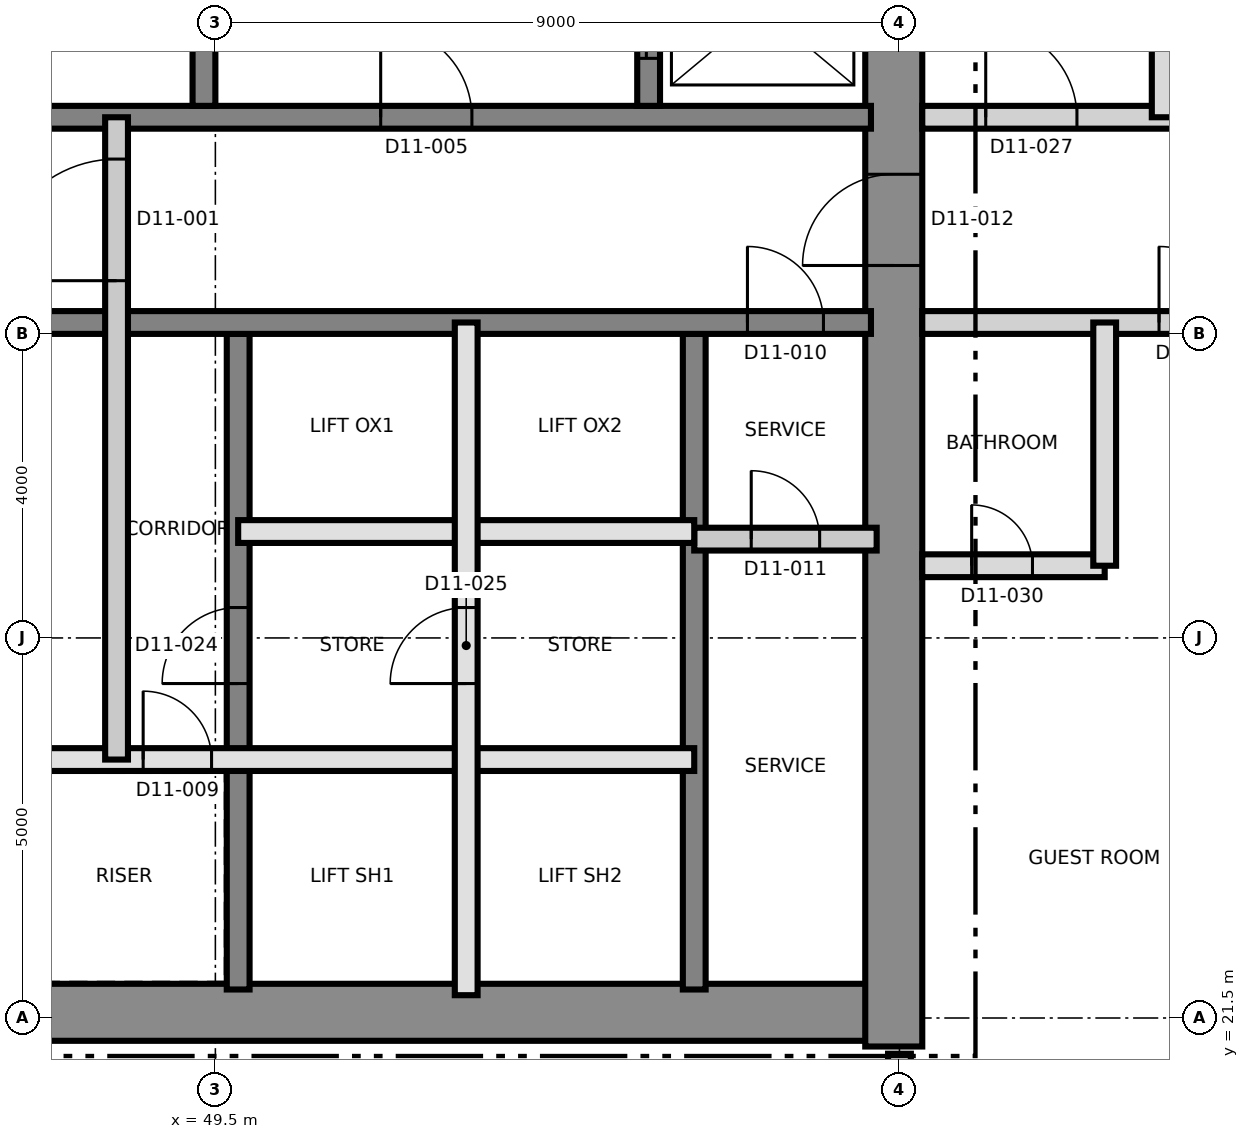
"""IFC4 building model, lengths in metres.
Left out: names, types, materials, properties, quantities, classifications, styles, units other than length and angle.
Written with IfcOpenShell. Run it as: python <this file> out.ifc"""

import sys

from ifc_helpers import new_model, si_unit, direction, frame, frame_2d, origin, place, context, subcontext, project, spatial, rectangle, extrude, element, fill, save


model = new_model("IFC4")
c1 = context("Model", 3, precision=1e-05, world=origin(), true_north=direction((0.0, 1.0)))
c2 = subcontext(c1, "Body", "Model", "MODEL_VIEW")
j1 = project(units=[si_unit("LENGTHUNIT", "METRE"), si_unit("PLANEANGLEUNIT", "RADIAN")], contexts=[c1])
p1 = place(None, origin())
s1 = spatial("IfcSite", under=j1, at=p1, CompositionType="ELEMENT")
p2 = place(p1, origin())
s2 = spatial("IfcBuilding", under=s1, at=p2, CompositionType="ELEMENT")
p3 = place(p2, frame((0.0, 0.0, 131.5)))
s3 = spatial("IfcBuildingStorey", under=s2, at=p3, CompositionType="ELEMENT", Elevation=131.5)
p4 = place(p3, frame((31.125, 21.575, 0.0), z_axis=(0.0, 0.0, 1.0), x_axis=(1.0, 0.0, 0.0)))
e1 = element("IfcWall", 1, at=p4, inside=s3, PredefinedType="SHEAR", context=c2, shape_type="SweptSolid", body=[
    extrude(rectangle(XDim=27.0, YDim=0.75, at=frame_2d((13.5, 0.0))), origin(), (0.0, 0.0, 1.0), 3.7),
])
p5 = place(p3, frame((58.425, 21.125, 0.0), z_axis=(0.0, 0.0, 1.0), x_axis=(0.0, 1.0, 0.0)))
e2 = element("IfcWall", 2, at=p5, inside=s3, PredefinedType="SHEAR", context=c2, shape_type="SweptSolid", body=[
    extrude(rectangle(XDim=18.75, YDim=0.75, at=frame_2d((9.375, 0.0))), origin(), (0.0, 0.0, 1.0), 3.7),
])
p6 = place(p5, frame((10.275, 0.0, 0.0)))
e3 = element("IfcOpeningElement", 3, at=p6, cuts=e2, PredefinedType="OPENING", context=c2, shape_type="SweptSolid", body=[
    extrude(rectangle(XDim=1.2, YDim=2.1, at=frame_2d((0.6, 1.05))), frame((0.0, 0.385, 0.0), z_axis=(0.0, -1.0, 0.0), x_axis=(1.0, 0.0, 0.0)), (0.0, 0.0, 1.0), 0.77),
])
p7 = place(p3, frame((49.8, 21.875, 0.0), z_axis=(0.0, 0.0, 1.0), x_axis=(0.0, 1.0, 0.0)))
e4 = element("IfcWall", 4, at=p7, inside=s3, PredefinedType="SHEAR", context=c2, shape_type="SweptSolid", body=[
    extrude(rectangle(XDim=8.625, YDim=0.3, at=frame_2d((4.312, 0.0))), origin(), (0.0, 0.0, 1.0), 3.7),
])
p8 = place(p7, frame((4.025, 0.0, 0.0)))
e5 = element("IfcOpeningElement", 5, at=p8, cuts=e4, PredefinedType="OPENING", context=c2, shape_type="SweptSolid", body=[
    extrude(rectangle(XDim=1.0, YDim=2.1, at=frame_2d((0.5, 1.05))), frame((0.0, 0.16, 0.0), z_axis=(0.0, -1.0, 0.0), x_axis=(1.0, 0.0, 0.0)), (0.0, 0.0, 1.0), 0.32),
])
p9 = place(p3, frame((55.8, 21.875, 0.0), z_axis=(0.0, 0.0, 1.0), x_axis=(0.0, 1.0, 0.0)))
e6 = element("IfcWall", 6, at=p9, inside=s3, PredefinedType="SHEAR", context=c2, shape_type="SweptSolid", body=[
    extrude(rectangle(XDim=8.625, YDim=0.3, at=frame_2d((4.312, 0.0))), origin(), (0.0, 0.0, 1.0), 3.7),
])
p10 = place(p3, frame((31.875, 30.65, 0.0), z_axis=(0.0, 0.0, 1.0), x_axis=(1.0, 0.0, 0.0)))
e7 = element("IfcWall", 7, at=p10, inside=s3, PredefinedType="SHEAR", context=c2, shape_type="SweptSolid", body=[
    extrude(rectangle(XDim=26.25, YDim=0.3, at=frame_2d((13.125, 0.0))), origin(), (0.0, 0.0, 1.0), 3.7),
])
p11 = place(p10, frame((24.625, 0.0, 0.0)))
e8 = element("IfcOpeningElement", 8, at=p11, cuts=e7, PredefinedType="OPENING", context=c2, shape_type="SweptSolid", body=[
    extrude(rectangle(XDim=1.0, YDim=2.1, at=frame_2d((0.5, 1.05))), frame((0.0, 0.16, 0.0), z_axis=(0.0, -1.0, 0.0), x_axis=(1.0, 0.0, 0.0)), (0.0, 0.0, 1.0), 0.32),
])
p12 = place(p10, frame((11.425, 0.0, 0.0)))
e9 = element("IfcOpeningElement", 9, at=p12, cuts=e7, PredefinedType="OPENING", context=c2, shape_type="SweptSolid", body=[
    extrude(rectangle(XDim=1.0, YDim=2.1, at=frame_2d((0.5, 1.05))), frame((0.0, 0.16, 0.0), z_axis=(0.0, -1.0, 0.0), x_axis=(1.0, 0.0, 0.0)), (0.0, 0.0, 1.0), 0.32),
])
p13 = place(p3, frame((31.875, 33.35, 0.0), z_axis=(0.0, 0.0, 1.0), x_axis=(1.0, 0.0, 0.0)))
e10 = element("IfcWall", 10, at=p13, inside=s3, PredefinedType="SHEAR", context=c2, shape_type="SweptSolid", body=[
    extrude(rectangle(XDim=26.25, YDim=0.3, at=frame_2d((13.125, 0.0))), origin(), (0.0, 0.0, 1.0), 3.7),
])
p14 = place(p13, frame((13.2, 0.0, 0.0)))
e11 = element("IfcOpeningElement", 11, at=p14, cuts=e10, PredefinedType="OPENING", context=c2, shape_type="SweptSolid", body=[
    extrude(rectangle(XDim=1.4, YDim=2.1, at=frame_2d((0.7, 1.05))), frame((0.0, 0.16, 0.0), z_axis=(0.0, -1.0, 0.0), x_axis=(1.0, 0.0, 0.0)), (0.0, 0.0, 1.0), 0.32),
])
p15 = place(p13, frame((5.25, 0.0, 0.0)))
e12 = element("IfcOpeningElement", 12, at=p15, cuts=e10, PredefinedType="OPENING", context=c2, shape_type="SweptSolid", body=[
    extrude(rectangle(XDim=1.2, YDim=2.1, at=frame_2d((0.6, 1.05))), frame((0.0, 0.16, 0.0), z_axis=(0.0, -1.0, 0.0), x_axis=(1.0, 0.0, 0.0)), (0.0, 0.0, 1.0), 0.32),
])
p16 = place(p13, frame((19.8, 0.0, 0.0)))
e13 = element("IfcOpeningElement", 13, at=p16, cuts=e10, PredefinedType="OPENING", context=c2, shape_type="SweptSolid", body=[
    extrude(rectangle(XDim=1.2, YDim=2.1, at=frame_2d((0.6, 1.05))), frame((0.0, 0.16, 0.0), z_axis=(0.0, -1.0, 0.0), x_axis=(1.0, 0.0, 0.0)), (0.0, 0.0, 1.0), 0.32),
])
p17 = place(p3, frame((49.35, 33.5, 0.0), z_axis=(0.0, 0.0, 1.0), x_axis=(0.0, 1.0, 0.0)))
e14 = element("IfcWall", 14, at=p17, inside=s3, PredefinedType="SHEAR", context=c2, shape_type="SweptSolid", body=[
    extrude(rectangle(XDim=5.625, YDim=0.3, at=frame_2d((2.812, 0.0))), origin(), (0.0, 0.0, 1.0), 3.7),
])
p18 = place(p3, frame((55.2, 33.5, 0.0), z_axis=(0.0, 0.0, 1.0), x_axis=(0.0, 1.0, 0.0)))
e15 = element("IfcWall", 15, at=p18, inside=s3, PredefinedType="SHEAR", context=c2, shape_type="SweptSolid", body=[
    extrude(rectangle(XDim=2.55, YDim=0.3, at=frame_2d((1.275, 0.0))), origin(), (0.0, 0.0, 1.0), 3.7),
])
p19 = place(p18, frame((0.625, 0.0, 0.0)))
e16 = element("IfcOpeningElement", 16, at=p19, cuts=e15, PredefinedType="OPENING", context=c2, shape_type="SweptSolid", body=[
    extrude(rectangle(XDim=1.3, YDim=2.4, at=frame_2d((0.65, 1.2))), frame((0.0, 0.16, 0.0), z_axis=(0.0, -1.0, 0.0), x_axis=(1.0, 0.0, 0.0)), (0.0, 0.0, 1.0), 0.32),
])
p20 = place(p3, frame((46.8, 24.9, 0.0), z_axis=(0.0, 0.0, 1.0), x_axis=(1.0, 0.0, 0.0)))
e17 = element("IfcWall", 17, at=p20, inside=s3, PredefinedType="SOLIDWALL", context=c2, shape_type="SweptSolid", body=[
    extrude(rectangle(XDim=9.0, YDim=0.3, at=frame_2d((4.5, 0.0))), origin(), (0.0, 0.0, 1.0), 3.4),
])
p21 = place(p20, frame((1.75, 0.0, 0.0)))
e18 = element("IfcOpeningElement", 18, at=p21, cuts=e17, PredefinedType="OPENING", context=c2, shape_type="SweptSolid", body=[
    extrude(rectangle(XDim=0.9, YDim=2.1, at=frame_2d((0.45, 1.05))), frame((0.0, 0.16, 0.0), z_axis=(0.0, -1.0, 0.0), x_axis=(1.0, 0.0, 0.0)), (0.0, 0.0, 1.0), 0.32),
])
p22 = place(p3, frame((55.8, 27.8, 0.0), z_axis=(0.0, 0.0, 1.0), x_axis=(1.0, 0.0, 0.0)))
e19 = element("IfcWall", 19, at=p22, inside=s3, PredefinedType="PARTITIONING", context=c2, shape_type="SweptSolid", body=[
    extrude(rectangle(XDim=2.4, YDim=0.3, at=frame_2d((1.2, 0.0))), origin(), (0.0, 0.0, 1.0), 3.4),
])
p23 = place(p22, frame((0.75, 0.0, 0.0)))
e20 = element("IfcOpeningElement", 20, at=p23, cuts=e19, PredefinedType="OPENING", context=c2, shape_type="SweptSolid", body=[
    extrude(rectangle(XDim=0.9, YDim=2.1, at=frame_2d((0.45, 1.05))), frame((0.0, 0.16, 0.0), z_axis=(0.0, -1.0, 0.0), x_axis=(1.0, 0.0, 0.0)), (0.0, 0.0, 1.0), 0.32),
])
p24 = place(p3, frame((49.8, 27.9, 0.0), z_axis=(0.0, 0.0, 1.0), x_axis=(1.0, 0.0, 0.0)))
e21 = element("IfcWall", 21, at=p24, inside=s3, PredefinedType="SOLIDWALL", context=c2, shape_type="SweptSolid", body=[
    extrude(rectangle(XDim=6.0, YDim=0.3, at=frame_2d((3.0, 0.0))), origin(), (0.0, 0.0, 1.0), 3.4),
])
p25 = place(p3, frame((48.2, 24.9, 0.0), z_axis=(0.0, 0.0, 1.0), x_axis=(0.0, 1.0, 0.0)))
e22 = element("IfcWall", 22, at=p25, inside=s3, PredefinedType="PARTITIONING", context=c2, shape_type="SweptSolid", body=[
    extrude(rectangle(XDim=8.45, YDim=0.3, at=frame_2d((4.225, 0.0))), origin(), (0.0, 0.0, 1.0), 3.4),
])
p26 = place(p25, frame((6.3, 0.0, 0.0)))
e23 = element("IfcOpeningElement", 23, at=p26, cuts=e22, PredefinedType="OPENING", context=c2, shape_type="SweptSolid", body=[
    extrude(rectangle(XDim=1.6, YDim=2.1, at=frame_2d((0.8, 1.05))), frame((0.0, 0.16, 0.0), z_axis=(0.0, -1.0, 0.0), x_axis=(1.0, 0.0, 0.0)), (0.0, 0.0, 1.0), 0.32),
])
p27 = place(p3, frame((52.8, 21.8, 0.0), z_axis=(0.0, 0.0, 1.0), x_axis=(0.0, 1.0, 0.0)))
e24 = element("IfcWall", 24, at=p27, inside=s3, PredefinedType="SOLIDWALL", context=c2, shape_type="SweptSolid", body=[
    extrude(rectangle(XDim=8.85, YDim=0.3, at=frame_2d((4.425, 0.0))), origin(), (0.0, 0.0, 1.0), 3.4),
])
p28 = place(p27, frame((4.1, 0.0, 0.0)))
e25 = element("IfcOpeningElement", 25, at=p28, cuts=e24, PredefinedType="OPENING", context=c2, shape_type="SweptSolid", body=[
    extrude(rectangle(XDim=1.0, YDim=2.1, at=frame_2d((0.5, 1.05))), frame((0.0, 0.16, 0.0), z_axis=(0.0, -1.0, 0.0), x_axis=(1.0, 0.0, 0.0)), (0.0, 0.0, 1.0), 0.32),
])
p29 = place(p3, frame((58.8, 27.45, 0.0), z_axis=(0.0, 0.0, 1.0), x_axis=(1.0, 0.0, 0.0)))
e26 = element("IfcWall", 26, at=p29, inside=s3, PredefinedType="PARTITIONING", context=c2, shape_type="SweptSolid", body=[
    extrude(rectangle(XDim=2.4, YDim=0.3, at=frame_2d((1.2, 0.0))), origin(), (0.0, 0.0, 1.0), 3.4),
])
p30 = place(p29, frame((0.65, 0.0, 0.0)))
e27 = element("IfcOpeningElement", 27, at=p30, cuts=e26, PredefinedType="OPENING", context=c2, shape_type="SweptSolid", body=[
    extrude(rectangle(XDim=0.8, YDim=2.1, at=frame_2d((0.4, 1.05))), frame((0.0, 0.16, 0.0), z_axis=(0.0, -1.0, 0.0), x_axis=(1.0, 0.0, 0.0)), (0.0, 0.0, 1.0), 0.32),
])
p31 = place(p3, frame((58.8, 30.65, 0.0), z_axis=(0.0, 0.0, 1.0), x_axis=(1.0, 0.0, 0.0)))
e28 = element("IfcWall", 28, at=p31, inside=s3, PredefinedType="PARTITIONING", context=c2, shape_type="SweptSolid", body=[
    extrude(rectangle(XDim=26.53, YDim=0.3, at=frame_2d((13.265, 0.0))), origin(), (0.0, 0.0, 1.0), 3.4),
])
p32 = place(p31, frame((3.115, 0.0, 0.0)))
e29 = element("IfcOpeningElement", 29, at=p32, cuts=e28, PredefinedType="OPENING", context=c2, shape_type="SweptSolid", body=[
    extrude(rectangle(XDim=1.0, YDim=2.1, at=frame_2d((0.5, 1.05))), frame((0.0, 0.16, 0.0), z_axis=(0.0, -1.0, 0.0), x_axis=(1.0, 0.0, 0.0)), (0.0, 0.0, 1.0), 0.32),
])
p33 = place(p31, frame((6.065, 0.0, 0.0)))
e30 = element("IfcOpeningElement", 30, at=p33, cuts=e28, PredefinedType="OPENING", context=c2, shape_type="SweptSolid", body=[
    extrude(rectangle(XDim=1.4, YDim=2.1, at=frame_2d((0.7, 1.05))), frame((0.0, 0.16, 0.0), z_axis=(0.0, -1.0, 0.0), x_axis=(1.0, 0.0, 0.0)), (0.0, 0.0, 1.0), 0.32),
])
p34 = place(p31, frame((12.7, 0.0, 0.0)))
e31 = element("IfcOpeningElement", 31, at=p34, cuts=e28, PredefinedType="OPENING", context=c2, shape_type="SweptSolid", body=[
    extrude(rectangle(XDim=1.0, YDim=2.4, at=frame_2d((0.5, 1.2))), frame((0.0, 0.16, 0.0), z_axis=(0.0, -1.0, 0.0), x_axis=(1.0, 0.0, 0.0)), (0.0, 0.0, 1.0), 0.32),
])
p35 = place(p31, frame((18.85, 0.0, 0.0)))
e32 = element("IfcOpeningElement", 32, at=p35, cuts=e28, PredefinedType="OPENING", context=c2, shape_type="SweptSolid", body=[
    extrude(rectangle(XDim=1.0, YDim=2.1, at=frame_2d((0.5, 1.05))), frame((0.0, 0.16, 0.0), z_axis=(0.0, -1.0, 0.0), x_axis=(1.0, 0.0, 0.0)), (0.0, 0.0, 1.0), 0.32),
])
p36 = place(p31, frame((24.7, 0.0, 0.0)))
e33 = element("IfcOpeningElement", 33, at=p36, cuts=e28, PredefinedType="OPENING", context=c2, shape_type="SweptSolid", body=[
    extrude(rectangle(XDim=1.0, YDim=2.1, at=frame_2d((0.5, 1.05))), frame((0.0, 0.16, 0.0), z_axis=(0.0, -1.0, 0.0), x_axis=(1.0, 0.0, 0.0)), (0.0, 0.0, 1.0), 0.32),
])
p37 = place(p3, frame((58.8, 33.35, 0.0), z_axis=(0.0, 0.0, 1.0), x_axis=(1.0, 0.0, 0.0)))
e34 = element("IfcWall", 34, at=p37, inside=s3, PredefinedType="PARTITIONING", context=c2, shape_type="SweptSolid", body=[
    extrude(rectangle(XDim=26.53, YDim=0.3, at=frame_2d((13.265, 0.0))), origin(), (0.0, 0.0, 1.0), 3.4),
])
p38 = place(p37, frame((0.835, 0.0, 0.0)))
e35 = element("IfcOpeningElement", 35, at=p38, cuts=e34, PredefinedType="OPENING", context=c2, shape_type="SweptSolid", body=[
    extrude(rectangle(XDim=1.2, YDim=2.1, at=frame_2d((0.6, 1.05))), frame((0.0, 0.16, 0.0), z_axis=(0.0, -1.0, 0.0), x_axis=(1.0, 0.0, 0.0)), (0.0, 0.0, 1.0), 0.32),
])
p39 = place(p37, frame((4.085, 0.0, 0.0)))
e36 = element("IfcOpeningElement", 36, at=p39, cuts=e34, PredefinedType="OPENING", context=c2, shape_type="SweptSolid", body=[
    extrude(rectangle(XDim=1.0, YDim=2.1, at=frame_2d((0.5, 1.05))), frame((0.0, 0.16, 0.0), z_axis=(0.0, -1.0, 0.0), x_axis=(1.0, 0.0, 0.0)), (0.0, 0.0, 1.0), 0.32),
])
p40 = place(p37, frame((12.7, 0.0, 0.0)))
e37 = element("IfcOpeningElement", 37, at=p40, cuts=e34, PredefinedType="OPENING", context=c2, shape_type="SweptSolid", body=[
    extrude(rectangle(XDim=1.0, YDim=2.4, at=frame_2d((0.5, 1.2))), frame((0.0, 0.16, 0.0), z_axis=(0.0, -1.0, 0.0), x_axis=(1.0, 0.0, 0.0)), (0.0, 0.0, 1.0), 0.32),
])
p41 = place(p37, frame((21.115, 0.0, 0.0)))
e38 = element("IfcOpeningElement", 38, at=p41, cuts=e34, PredefinedType="OPENING", context=c2, shape_type="SweptSolid", body=[
    extrude(rectangle(XDim=1.0, YDim=2.1, at=frame_2d((0.5, 1.05))), frame((0.0, 0.16, 0.0), z_axis=(0.0, -1.0, 0.0), x_axis=(1.0, 0.0, 0.0)), (0.0, 0.0, 1.0), 0.32),
])
p42 = place(p37, frame((24.065, 0.0, 0.0)))
e39 = element("IfcOpeningElement", 39, at=p42, cuts=e34, PredefinedType="OPENING", context=c2, shape_type="SweptSolid", body=[
    extrude(rectangle(XDim=1.4, YDim=2.1, at=frame_2d((0.7, 1.05))), frame((0.0, 0.16, 0.0), z_axis=(0.0, -1.0, 0.0), x_axis=(1.0, 0.0, 0.0)), (0.0, 0.0, 1.0), 0.32),
])
p43 = place(p3, frame((58.5, 20.135, 0.0), z_axis=(0.0, 0.0, 1.0), x_axis=(0.0, 1.0, 0.0)))
e40 = element("IfcWall", 40, at=p43, inside=s3, PredefinedType="PARTITIONING", context=c2, shape_type="SweptSolid", body=[
    extrude(rectangle(XDim=0.895, YDim=0.3, at=frame_2d((0.448, 0.0))), origin(), (0.0, 0.0, 1.0), 3.35),
])
p44 = place(p3, frame((61.2, 27.45, 0.0), z_axis=(0.0, 0.0, 1.0), x_axis=(0.0, 1.0, 0.0)))
e41 = element("IfcWall", 41, at=p44, inside=s3, PredefinedType="PARTITIONING", context=c2, shape_type="SweptSolid", body=[
    extrude(rectangle(XDim=3.2, YDim=0.3, at=frame_2d((1.6, 0.0))), origin(), (0.0, 0.0, 1.0), 3.4),
])
p45 = place(p3, frame((61.97, 33.35, 0.0), z_axis=(0.0, 0.0, 1.0), x_axis=(0.0, 1.0, 0.0)))
e42 = element("IfcWall", 42, at=p45, inside=s3, PredefinedType="PARTITIONING", context=c2, shape_type="SweptSolid", body=[
    extrude(rectangle(XDim=7.695, YDim=0.3, at=frame_2d((3.847, 0.0))), origin(), (0.0, 0.0, 1.0), 3.35),
])
p46 = place(p26, origin())
e43 = element("IfcDoor", 43, at=p46, inside=s3, OperationType="SINGLE_SWING_LEFT", PredefinedType="DOOR", context=c2, shape_type="SweptSolid", body=[
    extrude(rectangle(XDim=1.6, YDim=2.1, at=frame_2d((0.8, 1.05))), frame((0.0, 0.025, 0.0), z_axis=(0.0, -1.0, 0.0), x_axis=(1.0, 0.0, 0.0)), (0.0, 0.0, 1.0), 0.05),
])
fill(e23, e43)
p47 = place(p16, origin())
e44 = element("IfcDoor", 44, at=p47, inside=s3, OperationType="SINGLE_SWING_RIGHT", PredefinedType="DOOR", context=c2, shape_type="SweptSolid", body=[
    extrude(rectangle(XDim=1.2, YDim=2.1, at=frame_2d((0.6, 1.05))), frame((0.0, 0.025, 0.0), z_axis=(0.0, -1.0, 0.0), x_axis=(1.0, 0.0, 0.0)), (0.0, 0.0, 1.0), 0.05),
])
fill(e13, e44)
p48 = place(p21, origin())
e45 = element("IfcDoor", 45, at=p48, inside=s3, OperationType="SINGLE_SWING_RIGHT", PredefinedType="DOOR", context=c2, shape_type="SweptSolid", body=[
    extrude(rectangle(XDim=0.9, YDim=2.1, at=frame_2d((0.45, 1.05))), frame((0.0, 0.025, 0.0), z_axis=(0.0, -1.0, 0.0), x_axis=(1.0, 0.0, 0.0)), (0.0, 0.0, 1.0), 0.05),
])
fill(e18, e45)
p49 = place(p11, origin())
e46 = element("IfcDoor", 46, at=p49, inside=s3, OperationType="SINGLE_SWING_LEFT", PredefinedType="DOOR", context=c2, shape_type="SweptSolid", body=[
    extrude(rectangle(XDim=1.0, YDim=2.1, at=frame_2d((0.5, 1.05))), frame((0.0, 0.025, 0.0), z_axis=(0.0, -1.0, 0.0), x_axis=(1.0, 0.0, 0.0)), (0.0, 0.0, 1.0), 0.05),
])
fill(e8, e46)
p50 = place(p23, origin())
e47 = element("IfcDoor", 47, at=p50, inside=s3, OperationType="SINGLE_SWING_RIGHT", PredefinedType="DOOR", context=c2, shape_type="SweptSolid", body=[
    extrude(rectangle(XDim=0.9, YDim=2.1, at=frame_2d((0.45, 1.05))), frame((0.0, 0.025, 0.0), z_axis=(0.0, -1.0, 0.0), x_axis=(1.0, 0.0, 0.0)), (0.0, 0.0, 1.0), 0.05),
])
fill(e20, e47)
p51 = place(p6, origin())
e48 = element("IfcDoor", 48, at=p51, inside=s3, OperationType="SINGLE_SWING_LEFT", PredefinedType="DOOR", context=c2, shape_type="SweptSolid", body=[
    extrude(rectangle(XDim=1.2, YDim=2.1, at=frame_2d((0.6, 1.05))), frame((0.0, 0.025, 0.0), z_axis=(0.0, -1.0, 0.0), x_axis=(1.0, 0.0, 0.0)), (0.0, 0.0, 1.0), 0.05),
])
fill(e3, e48)
p52 = place(p19, origin())
e49 = element("IfcDoor", 49, at=p52, inside=s3, OperationType="SLIDING_TO_LEFT", PredefinedType="DOOR", context=c2, shape_type="SweptSolid", body=[
    extrude(rectangle(XDim=1.3, YDim=2.4, at=frame_2d((0.65, 1.2))), frame((0.0, 0.025, 0.0), z_axis=(0.0, -1.0, 0.0), x_axis=(1.0, 0.0, 0.0)), (0.0, 0.0, 1.0), 0.05),
])
fill(e16, e49)
p53 = place(p8, origin())
e50 = element("IfcDoor", 50, at=p53, inside=s3, OperationType="SINGLE_SWING_LEFT", PredefinedType="DOOR", context=c2, shape_type="SweptSolid", body=[
    extrude(rectangle(XDim=1.0, YDim=2.1, at=frame_2d((0.5, 1.05))), frame((0.0, 0.025, 0.0), z_axis=(0.0, -1.0, 0.0), x_axis=(1.0, 0.0, 0.0)), (0.0, 0.0, 1.0), 0.05),
])
fill(e5, e50)
p54 = place(p28, origin())
e51 = element("IfcDoor", 51, at=p54, inside=s3, OperationType="SINGLE_SWING_RIGHT", PredefinedType="DOOR", context=c2, shape_type="SweptSolid", body=[
    extrude(rectangle(XDim=1.0, YDim=2.1, at=frame_2d((0.5, 1.05))), frame((0.0, 0.025, 0.0), z_axis=(0.0, -1.0, 0.0), x_axis=(1.0, 0.0, 0.0)), (0.0, 0.0, 1.0), 0.05),
])
fill(e25, e51)
p55 = place(p38, origin())
e52 = element("IfcDoor", 52, at=p55, inside=s3, OperationType="SINGLE_SWING_LEFT", PredefinedType="DOOR", context=c2, shape_type="SweptSolid", body=[
    extrude(rectangle(XDim=1.2, YDim=2.1, at=frame_2d((0.6, 1.05))), frame((0.0, 0.025, 0.0), z_axis=(0.0, -1.0, 0.0), x_axis=(1.0, 0.0, 0.0)), (0.0, 0.0, 1.0), 0.05),
])
fill(e35, e52)
p56 = place(p30, origin())
e53 = element("IfcDoor", 53, at=p56, inside=s3, OperationType="SINGLE_SWING_LEFT", PredefinedType="DOOR", context=c2, shape_type="SweptSolid", body=[
    extrude(rectangle(XDim=0.8, YDim=2.1, at=frame_2d((0.4, 1.05))), frame((0.0, 0.025, 0.0), z_axis=(0.0, -1.0, 0.0), x_axis=(1.0, 0.0, 0.0)), (0.0, 0.0, 1.0), 0.05),
])
fill(e27, e53)
p57 = place(p32, origin())
e54 = element("IfcDoor", 54, at=p57, inside=s3, OperationType="SINGLE_SWING_LEFT", PredefinedType="DOOR", context=c2, shape_type="SweptSolid", body=[
    extrude(rectangle(XDim=1.0, YDim=2.1, at=frame_2d((0.5, 1.05))), frame((0.0, 0.025, 0.0), z_axis=(0.0, -1.0, 0.0), x_axis=(1.0, 0.0, 0.0)), (0.0, 0.0, 1.0), 0.05),
])
fill(e29, e54)
save(model, sys.argv[1])
